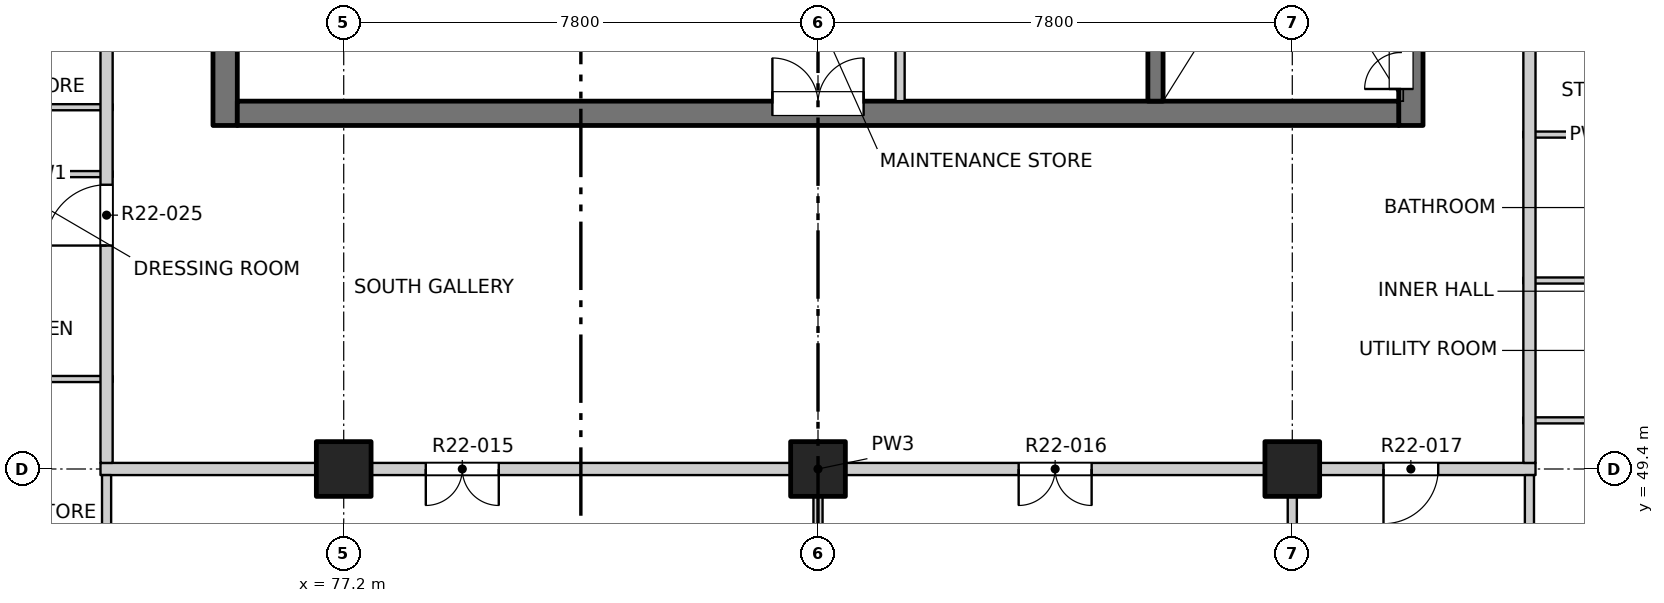
"""IFC4 building model, lengths in metres.
Left out: names, types, materials, properties, quantities, classifications, styles, units other than length and angle.
Written with IfcOpenShell. Run it as: python <this file> out.ifc"""

import sys

from ifc_helpers import new_model, si_unit, direction, frame, frame_2d, origin, origin_2d, place, context, subcontext, project, spatial, rectangle, extrude, element, fill, save


model = new_model("IFC4")
c1 = context("Model", 3, precision=1e-05, world=origin(), true_north=direction((0.0, 1.0)))
c2 = subcontext(c1, "Body", "Model", "MODEL_VIEW")
j1 = project(units=[si_unit("LENGTHUNIT", "METRE"), si_unit("PLANEANGLEUNIT", "RADIAN")], contexts=[c1])
p1 = place(None, origin())
s1 = spatial("IfcSite", under=j1, at=p1, CompositionType="ELEMENT")
p2 = place(p1, origin())
s2 = spatial("IfcBuilding", under=s1, at=p2, CompositionType="ELEMENT")
p3 = place(p2, frame((0.0, 0.0, 224.5)))
s3 = spatial("IfcBuildingStorey", under=s2, at=p3, CompositionType="ELEMENT", Elevation=224.5)
for number, where, z_axis, x_axis in (
    (1, (77.2, 49.4, -0.25), (0.0, 0.0, 1.0), (1.0, 0.0, 0.0)),
    (2, (85.0, 49.4, -0.25), (0.0, 0.0, 1.0), (1.0, 0.0, 0.0)),
    (3, (92.8, 49.4, -0.25), (0.0, 0.0, 1.0), (1.0, 0.0, 0.0)),
):
    element("IfcColumn", number, at=place(p3, frame(where, z_axis=z_axis, x_axis=x_axis)), inside=s3, PredefinedType="COLUMN", context=c2, shape_type="SweptSolid", body=[
        extrude(rectangle(XDim=0.9, YDim=0.9, at=origin_2d()), origin(), (0.0, 0.0, 1.0), 3.4),
    ])
p4 = place(p3, frame((75.25, 55.05, -0.25), z_axis=(0.0, 0.0, 1.0), x_axis=(0.0, 1.0, 0.0)))
e4 = element("IfcWall", 4, at=p4, inside=s3, PredefinedType="SOLIDWALL", context=c2, shape_type="SweptSolid", body=[
    extrude(rectangle(XDim=22.25, YDim=0.4, at=frame_2d((11.125, 0.0))), origin(), (0.0, 0.0, 1.0), 3.4),
])
p5 = place(p4, frame((7.4, 0.0, 0.25)))
e5 = element("IfcOpeningElement", 5, at=p5, cuts=e4, PredefinedType="OPENING", context=c2, shape_type="SweptSolid", body=[
    extrude(rectangle(XDim=0.9, YDim=2.1, at=frame_2d((0.45, 1.05))), frame((0.0, 0.21, 0.0), z_axis=(0.0, -1.0, 0.0), x_axis=(1.0, 0.0, 0.0)), (0.0, 0.0, 1.0), 0.42),
])
p6 = place(p4, frame((10.7, 0.0, 0.25)))
e6 = element("IfcOpeningElement", 6, at=p6, cuts=e4, PredefinedType="OPENING", context=c2, shape_type="SweptSolid", body=[
    extrude(rectangle(XDim=0.9, YDim=2.1, at=frame_2d((0.45, 1.05))), frame((0.0, 0.21, 0.0), z_axis=(0.0, -1.0, 0.0), x_axis=(1.0, 0.0, 0.0)), (0.0, 0.0, 1.0), 0.42),
])
p7 = place(p4, frame((15.2, 0.0, 0.25)))
e7 = element("IfcOpeningElement", 7, at=p7, cuts=e4, PredefinedType="OPENING", context=c2, shape_type="SweptSolid", body=[
    extrude(rectangle(XDim=0.9, YDim=2.1, at=frame_2d((0.45, 1.05))), frame((0.0, 0.21, 0.0), z_axis=(0.0, -1.0, 0.0), x_axis=(1.0, 0.0, 0.0)), (0.0, 0.0, 1.0), 0.42),
])
p8 = place(p4, frame((20.0, 0.0, 0.25)))
e8 = element("IfcOpeningElement", 8, at=p8, cuts=e4, PredefinedType="OPENING", context=c2, shape_type="SweptSolid", body=[
    extrude(rectangle(XDim=0.9, YDim=2.1, at=frame_2d((0.45, 1.05))), frame((0.0, 0.21, 0.0), z_axis=(0.0, -1.0, 0.0), x_axis=(1.0, 0.0, 0.0)), (0.0, 0.0, 1.0), 0.42),
])
p9 = place(p3, frame((94.75, 55.05, -0.25), z_axis=(0.0, 0.0, 1.0), x_axis=(0.0, 1.0, 0.0)))
e9 = element("IfcWall", 9, at=p9, inside=s3, PredefinedType="SOLIDWALL", context=c2, shape_type="SweptSolid", body=[
    extrude(rectangle(XDim=6.9, YDim=0.4, at=frame_2d((3.45, 0.0))), origin(), (0.0, 0.0, 1.0), 3.4),
])
p10 = place(p9, frame((0.6, 0.0, 0.25)))
e10 = element("IfcOpeningElement", 10, at=p10, cuts=e9, PredefinedType="OPENING", context=c2, shape_type="SweptSolid", body=[
    extrude(rectangle(XDim=1.2, YDim=2.1, at=frame_2d((0.6, 1.05))), frame((0.0, 0.21, 0.0), z_axis=(0.0, -1.0, 0.0), x_axis=(1.0, 0.0, 0.0)), (0.0, 0.0, 1.0), 0.42),
])
p11 = place(p3, frame((75.45, 55.25, -0.25), z_axis=(0.0, 0.0, 1.0), x_axis=(1.0, 0.0, 0.0)))
e11 = element("IfcWall", 11, at=p11, inside=s3, PredefinedType="SOLIDWALL", context=c2, shape_type="SweptSolid", body=[
    extrude(rectangle(XDim=19.1, YDim=0.4, at=frame_2d((9.55, 0.0))), origin(), (0.0, 0.0, 1.0), 3.4),
])
p12 = place(p11, frame((8.8, 0.0, 0.25)))
e12 = element("IfcOpeningElement", 12, at=p12, cuts=e11, PredefinedType="OPENING", context=c2, shape_type="SweptSolid", body=[
    extrude(rectangle(XDim=1.5, YDim=2.1, at=frame_2d((0.75, 1.05))), frame((0.0, 0.21, 0.0), z_axis=(0.0, -1.0, 0.0), x_axis=(1.0, 0.0, 0.0)), (0.0, 0.0, 1.0), 0.42),
])
p13 = place(p3, frame((90.55, 55.45, -0.25), z_axis=(0.0, 0.0, 1.0), x_axis=(0.0, 1.0, 0.0)))
e13 = element("IfcWall", 13, at=p13, inside=s3, PredefinedType="SOLIDWALL", context=c2, shape_type="SweptSolid", body=[
    extrude(rectangle(XDim=6.5, YDim=0.25, at=frame_2d((3.25, 0.0))), origin(), (0.0, 0.0, 1.0), 3.4),
])
p14 = place(p3, frame((73.2, 49.4, 0.0), z_axis=(0.0, 0.0, 1.0), x_axis=(1.0, 0.0, 0.0)))
e14 = element("IfcWall", 14, at=p14, inside=s3, PredefinedType="PARTITIONING", context=c2, shape_type="SweptSolid", body=[
    extrude(rectangle(XDim=23.6, YDim=0.2, at=frame_2d((11.8, 0.0))), origin(), (0.0, 0.0, 1.0), 3.15),
])
p15 = place(p14, frame((5.35, 0.0, 0.0)))
e15 = element("IfcOpeningElement", 15, at=p15, cuts=e14, PredefinedType="OPENING", context=c2, shape_type="SweptSolid", body=[
    extrude(rectangle(XDim=1.2, YDim=2.1, at=frame_2d((0.6, 1.05))), frame((0.0, 0.11, 0.0), z_axis=(0.0, -1.0, 0.0), x_axis=(1.0, 0.0, 0.0)), (0.0, 0.0, 1.0), 0.22),
])
p16 = place(p14, frame((15.1, 0.0, 0.0)))
e16 = element("IfcOpeningElement", 16, at=p16, cuts=e14, PredefinedType="OPENING", context=c2, shape_type="SweptSolid", body=[
    extrude(rectangle(XDim=1.2, YDim=2.1, at=frame_2d((0.6, 1.05))), frame((0.0, 0.11, 0.0), z_axis=(0.0, -1.0, 0.0), x_axis=(1.0, 0.0, 0.0)), (0.0, 0.0, 1.0), 0.22),
])
p17 = place(p14, frame((21.1, 0.0, 0.0)))
e17 = element("IfcOpeningElement", 17, at=p17, cuts=e14, PredefinedType="OPENING", context=c2, shape_type="SweptSolid", body=[
    extrude(rectangle(XDim=0.9, YDim=2.1, at=frame_2d((0.45, 1.05))), frame((0.0, 0.11, 0.0), z_axis=(0.0, -1.0, 0.0), x_axis=(1.0, 0.0, 0.0)), (0.0, 0.0, 1.0), 0.22),
])
for number, where, z_axis, x_axis in (
    (18, (96.6, 50.2, 0.0), (0.0, 0.0, 1.0), (1.0, 0.0, 0.0)),
    (19, (71.18, 50.88, 0.0), (0.0, 0.0, 1.0), (1.0, 0.0, 0.0)),
    (20, (96.6, 52.5, 0.0), (0.0, 0.0, 1.0), (1.0, 0.0, 0.0)),
    (21, (71.18, 54.25, 0.0), (0.0, 0.0, 1.0), (1.0, 0.0, 0.0)),
    (22, (96.6, 54.9, 0.0), (0.0, 0.0, 1.0), (1.0, 0.0, 0.0)),
    (23, (71.18, 55.35, 0.0), (0.0, 0.0, 1.0), (1.0, 0.0, 0.0)),
):
    element("IfcWall", number, at=place(p3, frame(where, z_axis=z_axis, x_axis=x_axis)), inside=s3, PredefinedType="PARTITIONING", context=c2, shape_type="SweptSolid", body=[
        extrude(rectangle(XDim=2.22, YDim=0.1, at=frame_2d((1.11, 0.0))), origin(), (0.0, 0.0, 1.0), 3.15),
    ])
p18 = place(p3, frame((73.3, 41.9, 0.0), z_axis=(0.0, 0.0, 1.0), x_axis=(0.0, 1.0, 0.0)))
e24 = element("IfcWall", 24, at=p18, inside=s3, PredefinedType="PARTITIONING", context=c2, shape_type="SweptSolid", body=[
    extrude(rectangle(XDim=7.4, YDim=0.15, at=frame_2d((3.7, 0.0))), origin(), (0.0, 0.0, 1.0), 3.15),
])
p19 = place(p3, frame((73.3, 49.5, 0.0), z_axis=(0.0, 0.0, 1.0), x_axis=(0.0, 1.0, 0.0)))
e25 = element("IfcWall", 25, at=p19, inside=s3, PredefinedType="PARTITIONING", context=c2, shape_type="SweptSolid", body=[
    extrude(rectangle(XDim=34.9, YDim=0.2, at=frame_2d((17.45, 0.0))), origin(), (0.0, 0.0, 1.0), 3.15),
])
p20 = place(p19, frame((3.575, 0.0, 0.0)))
e26 = element("IfcOpeningElement", 26, at=p20, cuts=e25, PredefinedType="OPENING", context=c2, shape_type="SweptSolid", body=[
    extrude(rectangle(XDim=1.0, YDim=2.1, at=frame_2d((0.5, 1.05))), frame((0.0, 0.11, 0.0), z_axis=(0.0, -1.0, 0.0), x_axis=(1.0, 0.0, 0.0)), (0.0, 0.0, 1.0), 0.22),
])
p21 = place(p19, frame((18.075, 0.0, 0.0)))
e27 = element("IfcOpeningElement", 27, at=p21, cuts=e25, PredefinedType="OPENING", context=c2, shape_type="SweptSolid", body=[
    extrude(rectangle(XDim=1.0, YDim=2.1, at=frame_2d((0.5, 1.05))), frame((0.0, 0.11, 0.0), z_axis=(0.0, -1.0, 0.0), x_axis=(1.0, 0.0, 0.0)), (0.0, 0.0, 1.0), 0.22),
])
p22 = place(p19, frame((26.175, 0.0, 0.0)))
e28 = element("IfcOpeningElement", 28, at=p22, cuts=e25, PredefinedType="OPENING", context=c2, shape_type="SweptSolid", body=[
    extrude(rectangle(XDim=1.0, YDim=2.1, at=frame_2d((0.5, 1.05))), frame((0.0, 0.11, 0.0), z_axis=(0.0, -1.0, 0.0), x_axis=(1.0, 0.0, 0.0)), (0.0, 0.0, 1.0), 0.22),
])
p23 = place(p3, frame((85.0, 41.9, 0.0), z_axis=(0.0, 0.0, 1.0), x_axis=(0.0, 1.0, 0.0)))
e29 = element("IfcWall", 29, at=p23, inside=s3, PredefinedType="PARTITIONING", context=c2, shape_type="SweptSolid", body=[
    extrude(rectangle(XDim=7.4, YDim=0.15, at=frame_2d((3.7, 0.0))), origin(), (0.0, 0.0, 1.0), 3.15),
])
p24 = place(p3, frame((86.35, 55.45, 0.0), z_axis=(0.0, 0.0, 1.0), x_axis=(0.0, 1.0, 0.0)))
e30 = element("IfcWall", 30, at=p24, inside=s3, PredefinedType="PARTITIONING", context=c2, shape_type="SweptSolid", body=[
    extrude(rectangle(XDim=5.575, YDim=0.15, at=frame_2d((2.788, 0.0))), origin(), (0.0, 0.0, 1.0), 3.15),
])
p25 = place(p24, frame((2.25, 0.0, 0.0)))
e31 = element("IfcOpeningElement", 31, at=p25, cuts=e30, PredefinedType="OPENING", context=c2, shape_type="SweptSolid", body=[
    extrude(rectangle(XDim=0.9, YDim=2.1, at=frame_2d((0.45, 1.05))), frame((0.0, 0.085, 0.0), z_axis=(0.0, -1.0, 0.0), x_axis=(1.0, 0.0, 0.0)), (0.0, 0.0, 1.0), 0.17),
])
for number, where, z_axis, x_axis in (
    (32, (92.8, 41.9, 0.0), (0.0, 0.0, 1.0), (0.0, 1.0, 0.0)),
    (33, (96.7, 41.9, 0.0), (0.0, 0.0, 1.0), (0.0, 1.0, 0.0)),
):
    element("IfcWall", number, at=place(p3, frame(where, z_axis=z_axis, x_axis=x_axis)), inside=s3, PredefinedType="PARTITIONING", context=c2, shape_type="SweptSolid", body=[
        extrude(rectangle(XDim=7.4, YDim=0.15, at=frame_2d((3.7, 0.0))), origin(), (0.0, 0.0, 1.0), 3.15),
    ])
p26 = place(p3, frame((96.7, 49.5, 0.0), z_axis=(0.0, 0.0, 1.0), x_axis=(0.0, 1.0, 0.0)))
e34 = element("IfcWall", 34, at=p26, inside=s3, PredefinedType="PARTITIONING", context=c2, shape_type="SweptSolid", body=[
    extrude(rectangle(XDim=34.9, YDim=0.2, at=frame_2d((17.45, 0.0))), origin(), (0.0, 0.0, 1.0), 3.15),
])
p27 = place(p26, frame((9.675, 0.0, 0.0)))
e35 = element("IfcOpeningElement", 35, at=p27, cuts=e34, PredefinedType="OPENING", context=c2, shape_type="SweptSolid", body=[
    extrude(rectangle(XDim=1.0, YDim=2.1, at=frame_2d((0.5, 1.05))), frame((0.0, 0.11, 0.0), z_axis=(0.0, -1.0, 0.0), x_axis=(1.0, 0.0, 0.0)), (0.0, 0.0, 1.0), 0.22),
])
p28 = place(p26, frame((22.925, 0.0, 0.0)))
e36 = element("IfcOpeningElement", 36, at=p28, cuts=e34, PredefinedType="OPENING", context=c2, shape_type="SweptSolid", body=[
    extrude(rectangle(XDim=1.0, YDim=2.1, at=frame_2d((0.5, 1.05))), frame((0.0, 0.11, 0.0), z_axis=(0.0, -1.0, 0.0), x_axis=(1.0, 0.0, 0.0)), (0.0, 0.0, 1.0), 0.22),
])
p29 = place(p26, frame((33.025, 0.0, 0.0)))
e37 = element("IfcOpeningElement", 37, at=p29, cuts=e34, PredefinedType="OPENING", context=c2, shape_type="SweptSolid", body=[
    extrude(rectangle(XDim=1.0, YDim=2.1, at=frame_2d((0.5, 1.05))), frame((0.0, 0.11, 0.0), z_axis=(0.0, -1.0, 0.0), x_axis=(1.0, 0.0, 0.0)), (0.0, 0.0, 1.0), 0.22),
])
p30 = place(p15, origin())
e38 = element("IfcDoor", 38, at=p30, inside=s3, OperationType="DOUBLE_DOOR_SINGLE_SWING", PredefinedType="DOOR", context=c2, shape_type="SweptSolid", body=[
    extrude(rectangle(XDim=1.2, YDim=2.1, at=frame_2d((0.6, 1.05))), frame((0.0, 0.025, 0.0), z_axis=(0.0, -1.0, 0.0), x_axis=(1.0, 0.0, 0.0)), (0.0, 0.0, 1.0), 0.05),
])
fill(e15, e38)
p31 = place(p16, origin())
e39 = element("IfcDoor", 39, at=p31, inside=s3, OperationType="DOUBLE_DOOR_SINGLE_SWING", PredefinedType="DOOR", context=c2, shape_type="SweptSolid", body=[
    extrude(rectangle(XDim=1.2, YDim=2.1, at=frame_2d((0.6, 1.05))), frame((0.0, 0.025, 0.0), z_axis=(0.0, -1.0, 0.0), x_axis=(1.0, 0.0, 0.0)), (0.0, 0.0, 1.0), 0.05),
])
fill(e16, e39)
p32 = place(p17, origin())
e40 = element("IfcDoor", 40, at=p32, inside=s3, OperationType="SINGLE_SWING_RIGHT", PredefinedType="DOOR", context=c2, shape_type="SweptSolid", body=[
    extrude(rectangle(XDim=0.9, YDim=2.1, at=frame_2d((0.45, 1.05))), frame((0.0, 0.025, 0.0), z_axis=(0.0, -1.0, 0.0), x_axis=(1.0, 0.0, 0.0)), (0.0, 0.0, 1.0), 0.05),
])
fill(e17, e40)
p33 = place(p20, origin())
e41 = element("IfcDoor", 41, at=p33, inside=s3, OperationType="SINGLE_SWING_LEFT", PredefinedType="DOOR", context=c2, shape_type="SweptSolid", body=[
    extrude(rectangle(XDim=1.0, YDim=2.1, at=frame_2d((0.5, 1.05))), frame((0.0, 0.025, 0.0), z_axis=(0.0, -1.0, 0.0), x_axis=(1.0, 0.0, 0.0)), (0.0, 0.0, 1.0), 0.05),
])
fill(e26, e41)
p34 = place(p12, origin())
e42 = element("IfcDoor", 42, at=p34, inside=s3, OperationType="DOUBLE_DOOR_SINGLE_SWING", PredefinedType="DOOR", context=c2, shape_type="SweptSolid", body=[
    extrude(rectangle(XDim=1.5, YDim=2.1, at=frame_2d((0.75, 1.05))), frame((0.0, 0.185, 0.0), z_axis=(0.0, -1.0, 0.0), x_axis=(1.0, 0.0, 0.0)), (0.0, 0.0, 1.0), 0.05),
])
fill(e12, e42)
p35 = place(p10, origin())
e43 = element("IfcDoor", 43, at=p35, inside=s3, OperationType="DOUBLE_DOOR_SINGLE_SWING", PredefinedType="DOOR", context=c2, shape_type="SweptSolid", body=[
    extrude(rectangle(XDim=1.2, YDim=2.1, at=frame_2d((0.6, 1.05))), frame((0.0, 0.185, 0.0), z_axis=(0.0, -1.0, 0.0), x_axis=(1.0, 0.0, 0.0)), (0.0, 0.0, 1.0), 0.05),
])
fill(e10, e43)
save(model, sys.argv[1])
